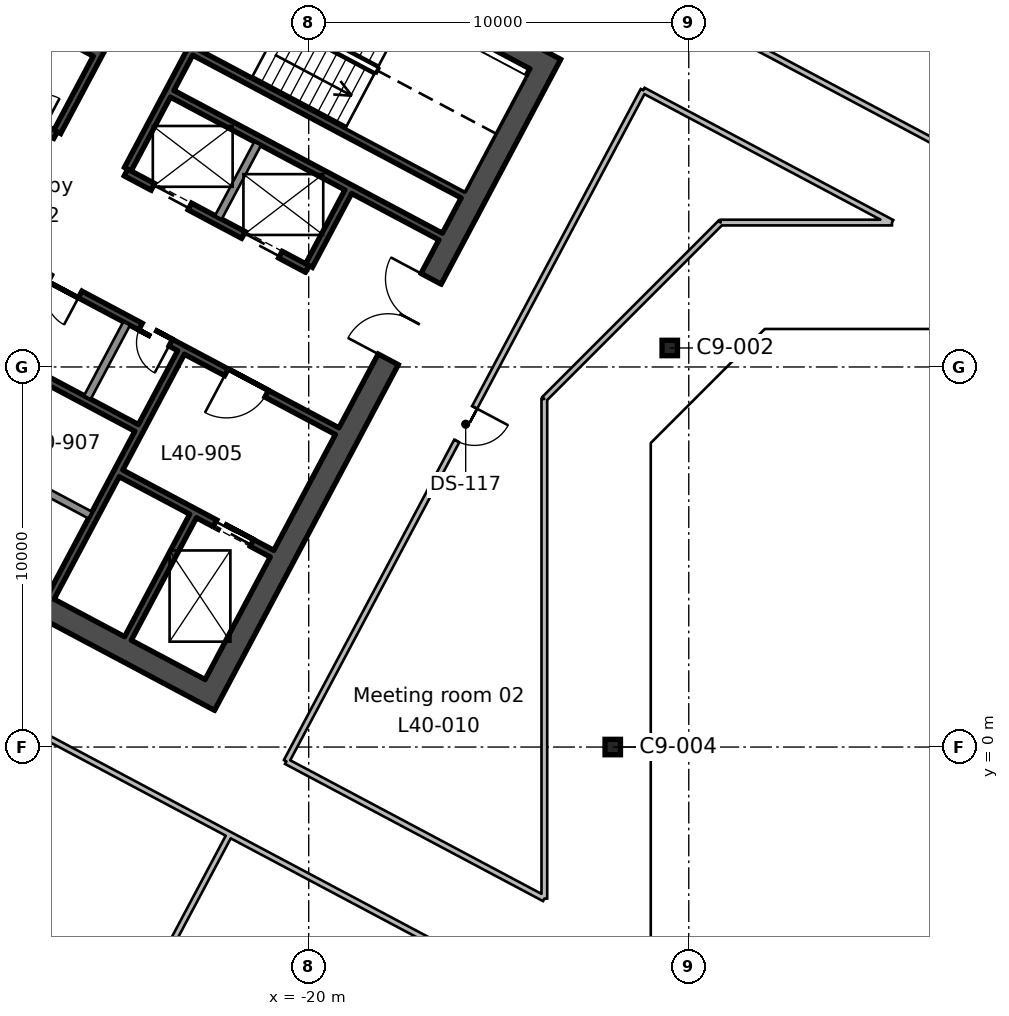
"""IFC4 building model, lengths in metres.
Left out: names, types, materials, properties, quantities, classifications, styles, units other than length and angle.
Written with IfcOpenShell. Run it as: python <this file> out.ifc"""

import sys

from ifc_helpers import new_model, si_unit, direction, frame, frame_2d, origin, origin_2d, place, context, subcontext, project, spatial, rectangle, hollow_rectangle, extrude, element, fill, save


model = new_model("IFC4")
c1 = context("Model", 3, precision=1e-05, world=origin(), true_north=direction((0.0, 1.0)))
c2 = subcontext(c1, "Body", "Model", "MODEL_VIEW")
j1 = project(units=[si_unit("LENGTHUNIT", "METRE"), si_unit("PLANEANGLEUNIT", "RADIAN")], contexts=[c1])
p1 = place(None, origin())
s1 = spatial("IfcSite", under=j1, at=p1, CompositionType="ELEMENT")
p2 = place(p1, origin())
s2 = spatial("IfcBuilding", under=s1, at=p2, CompositionType="ELEMENT")
p3 = place(p2, frame((0.0, 0.0, 189.6)))
s3 = spatial("IfcBuildingStorey", under=s2, at=p3, CompositionType="ELEMENT", Elevation=189.6)
for number, where, z_axis, x_axis in (
    (1, (-12.0, 0.0, 0.0), (0.0, 0.0, 1.0), (1.0, 0.0, 0.0)),
    (2, (-10.5, 10.5, 0.0), (0.0, 0.0, 1.0), (1.0, 0.0, 0.0)),
):
    element("IfcColumn", number, at=place(p3, frame(where, z_axis=z_axis, x_axis=x_axis)), inside=s3, PredefinedType="COLUMN", context=c2, shape_type="SweptSolid", body=[
        extrude(hollow_rectangle(XDim=0.406, YDim=0.406, WallThickness=0.015, InnerFilletRadius=0.007, OuterFilletRadius=0.022, at=origin_2d()), origin(), (0.0, 0.0, 1.0), 3.9),
    ])
p4 = place(p3, frame((-13.635, 18.236, 0.0), z_axis=(0.0, 0.0, 1.0), x_axis=(-0.469478769487, -0.88294376095, 0.0)))
e3 = element("IfcWall", 3, at=p4, inside=s3, PredefinedType="SHEAR", context=c2, shape_type="SweptSolid", body=[
    extrude(rectangle(XDim=19.4, YDim=0.6, at=frame_2d((9.7, 0.0))), origin(), (0.0, 0.0, 1.0), 3.9),
])
p5 = place(p4, frame((6.7, 0.0, 0.0)))
e4 = element("IfcOpeningElement", 4, at=p5, cuts=e3, PredefinedType="OPENING", context=c2, shape_type="SweptSolid", body=[
    extrude(rectangle(XDim=2.4, YDim=2.4, at=frame_2d((1.2, 1.2))), frame((0.0, 0.31, 0.0), z_axis=(0.0, -1.0, 0.0), x_axis=(1.0, 0.0, 0.0)), (0.0, 0.0, 1.0), 0.62),
])
p6 = place(p3, frame((-14.041, 18.112, 0.0), z_axis=(0.0, 0.0, 1.0), x_axis=(-0.882947755831, 0.46947125628, 0.0)))
e5 = element("IfcWall", 5, at=p6, inside=s3, PredefinedType="SHEAR", context=c2, shape_type="SweptSolid", body=[
    extrude(rectangle(XDim=20.2, YDim=0.6, at=frame_2d((10.1, 0.0))), origin(), (0.0, 0.0, 1.0), 3.9),
])
p7 = place(p3, frame((-22.867, 1.512, 0.0), z_axis=(0.0, 0.0, 1.0), x_axis=(-0.88294509198, 0.469476266226, 0.0)))
e6 = element("IfcWall", 6, at=p7, inside=s3, PredefinedType="SHEAR", context=c2, shape_type="SweptSolid", body=[
    extrude(rectangle(XDim=20.2, YDim=0.6, at=frame_2d((10.1, 0.0))), origin(), (0.0, 0.0, 1.0), 3.9),
])
p8 = place(p3, frame((-23.043, 6.08, 0.0), z_axis=(0.0, 0.0, 1.0), x_axis=(-0.469494272526, -0.882935517501, 0.0)))
e7 = element("IfcWall", 7, at=p8, inside=s3, PredefinedType="SHEAR", context=c2, shape_type="SweptSolid", body=[
    extrude(rectangle(XDim=3.65, YDim=0.2, at=frame_2d((1.825, 0.0))), origin(), (0.0, 0.0, 1.0), 3.9),
])
p9 = place(p3, frame((-18.96, 14.611, 0.0), z_axis=(0.0, 0.0, 1.0), x_axis=(-0.4694473164, -0.882960484464, 0.0)))
e8 = element("IfcWall", 8, at=p9, inside=s3, PredefinedType="SHEAR", context=c2, shape_type="SweptSolid", body=[
    extrude(rectangle(XDim=2.2, YDim=0.2, at=frame_2d((1.1, 0.0))), origin(), (0.0, 0.0, 1.0), 3.9),
])
p10 = place(p3, frame((-23.36, 10.382, 0.0), z_axis=(0.0, 0.0, 1.0), x_axis=(-0.469480409012, -0.88294288918, 0.0)))
e9 = element("IfcWall", 9, at=p10, inside=s3, PredefinedType="SHEAR", context=c2, shape_type="SweptSolid", body=[
    extrude(rectangle(XDim=7.3, YDim=0.2, at=frame_2d((3.65, 0.0))), origin(), (0.0, 0.0, 1.0), 3.9),
])
p11 = place(p3, frame((-21.344, 15.879, 0.0), z_axis=(0.0, 0.0, 1.0), x_axis=(-0.4694473164, -0.882960484464, 0.0)))
e10 = element("IfcWall", 10, at=p11, inside=s3, PredefinedType="SOLIDWALL", context=c2, shape_type="SweptSolid", body=[
    extrude(rectangle(XDim=2.2, YDim=0.2, at=frame_2d((1.1, 0.0))), origin(), (0.0, 0.0, 1.0), 3.9),
])
p12 = place(p3, frame((-24.791, 11.143, 0.0), z_axis=(0.0, 0.0, 1.0), x_axis=(-0.469487830541, -0.882938942948, 0.0)))
e11 = element("IfcWall", 11, at=p12, inside=s3, PredefinedType="SOLIDWALL", context=c2, shape_type="SweptSolid", body=[
    extrude(rectangle(XDim=2.2, YDim=0.2, at=frame_2d((1.1, 0.0))), origin(), (0.0, 0.0, 1.0), 3.9),
])
p13 = place(p3, frame((-21.333, 21.649, 0.0), z_axis=(0.0, 0.0, 1.0), x_axis=(-0.469494272526, -0.882935517501, 0.0)))
e12 = element("IfcWall", 12, at=p13, inside=s3, PredefinedType="SHEAR", context=c2, shape_type="SweptSolid", body=[
    extrude(rectangle(XDim=7.3, YDim=0.2, at=frame_2d((3.65, 0.0))), origin(), (0.0, 0.0, 1.0), 3.9),
])
p14 = place(p13, frame((1.3, 0.0, 0.0)))
e13 = element("IfcOpeningElement", 13, at=p14, cuts=e12, PredefinedType="OPENING", context=c2, shape_type="SweptSolid", body=[
    extrude(rectangle(XDim=1.2, YDim=2.1, at=frame_2d((0.6, 1.05))), frame((0.0, 0.11, 0.0), z_axis=(0.0, -1.0, 0.0), x_axis=(1.0, 0.0, 0.0)), (0.0, 0.0, 1.0), 0.22),
])
p15 = place(p3, frame((-23.188, 22.635, 0.0), z_axis=(0.0, 0.0, 1.0), x_axis=(-0.469454336211, -0.882956752176, 0.0)))
e14 = element("IfcWall", 14, at=p15, inside=s3, PredefinedType="SHEAR", context=c2, shape_type="SweptSolid", body=[
    extrude(rectangle(XDim=7.3, YDim=0.2, at=frame_2d((3.65, 0.0))), origin(), (0.0, 0.0, 1.0), 3.9),
])
p16 = place(p15, frame((0.45, 0.0, 0.0)))
e15 = element("IfcOpeningElement", 15, at=p16, cuts=e14, PredefinedType="OPENING", context=c2, shape_type="SweptSolid", body=[
    extrude(rectangle(XDim=0.9, YDim=2.1, at=frame_2d((0.45, 1.05))), frame((0.0, 0.11, 0.0), z_axis=(0.0, -1.0, 0.0), x_axis=(1.0, 0.0, 0.0)), (0.0, 0.0, 1.0), 0.22),
])
p17 = place(p15, frame((2.15, 0.0, 0.0)))
e16 = element("IfcOpeningElement", 16, at=p17, cuts=e14, PredefinedType="OPENING", context=c2, shape_type="SweptSolid", body=[
    extrude(rectangle(XDim=0.9, YDim=2.1, at=frame_2d((0.45, 1.05))), frame((0.0, 0.11, 0.0), z_axis=(0.0, -1.0, 0.0), x_axis=(1.0, 0.0, 0.0)), (0.0, 0.0, 1.0), 0.22),
])
p18 = place(p15, frame((3.75, 0.0, 0.0)))
e17 = element("IfcOpeningElement", 17, at=p18, cuts=e14, PredefinedType="OPENING", context=c2, shape_type="SweptSolid", body=[
    extrude(rectangle(XDim=0.9, YDim=2.1, at=frame_2d((0.45, 1.05))), frame((0.0, 0.11, 0.0), z_axis=(0.0, -1.0, 0.0), x_axis=(1.0, 0.0, 0.0)), (0.0, 0.0, 1.0), 0.22),
])
p19 = place(p3, frame((-15.942, 14.536, 0.0), z_axis=(0.0, 0.0, 1.0), x_axis=(-0.882946947542, 0.469472776449, 0.0)))
e18 = element("IfcWall", 18, at=p19, inside=s3, PredefinedType="SHEAR", context=c2, shape_type="SweptSolid", body=[
    extrude(rectangle(XDim=8.0, YDim=0.2, at=frame_2d((4.0, 0.0))), origin(), (0.0, 0.0, 1.0), 3.9),
])
p20 = place(p3, frame((-16.529, 13.432, 0.0), z_axis=(0.0, 0.0, 1.0), x_axis=(-0.88295287151, 0.469461634952, 0.0)))
e19 = element("IfcWall", 19, at=p20, inside=s3, PredefinedType="SHEAR", context=c2, shape_type="SweptSolid", body=[
    extrude(rectangle(XDim=8.0, YDim=0.2, at=frame_2d((4.0, 0.0))), origin(), (0.0, 0.0, 1.0), 3.9),
])
p21 = place(p3, frame((-25.623, 18.268, 0.0), z_axis=(0.0, 0.0, 1.0), x_axis=(-0.882953967957, 0.469459572775, 0.0)))
e20 = element("IfcWall", 20, at=p21, inside=s3, PredefinedType="SHEAR", context=c2, shape_type="SweptSolid", body=[
    extrude(rectangle(XDim=5.2, YDim=0.2, at=frame_2d((2.6, 0.0))), origin(), (0.0, 0.0, 1.0), 3.9),
])
p22 = place(p3, frame((-20.04, 12.581, 0.0), z_axis=(0.0, 0.0, 1.0), x_axis=(-0.882942972946, 0.469480251476, 0.0)))
e21 = element("IfcWall", 21, at=p22, inside=s3, PredefinedType="SHEAR", context=c2, shape_type="SweptSolid", body=[
    extrude(rectangle(XDim=5.4, YDim=0.2, at=frame_2d((2.7, 0.0))), origin(), (0.0, 0.0, 1.0), 3.9),
])
p23 = place(p22, frame((0.8, 0.0, 0.0)))
e22 = element("IfcOpeningElement", 22, at=p23, cuts=e21, PredefinedType="OPENING", context=c2, shape_type="SweptSolid", body=[
    extrude(rectangle(XDim=1.1, YDim=2.1, at=frame_2d((0.55, 1.05))), frame((0.0, 0.11, 0.0), z_axis=(0.0, -1.0, 0.0), x_axis=(1.0, 0.0, 0.0)), (0.0, 0.0, 1.0), 0.22),
])
p24 = place(p22, frame((3.5, 0.0, 0.0)))
e23 = element("IfcOpeningElement", 23, at=p24, cuts=e21, PredefinedType="OPENING", context=c2, shape_type="SweptSolid", body=[
    extrude(rectangle(XDim=1.1, YDim=2.1, at=frame_2d((0.55, 1.05))), frame((0.0, 0.11, 0.0), z_axis=(0.0, -1.0, 0.0), x_axis=(1.0, 0.0, 0.0)), (0.0, 0.0, 1.0), 0.22),
])
p25 = place(p3, frame((-26.662, 16.102, 0.0), z_axis=(0.0, 0.0, 1.0), x_axis=(-0.882940221191, 0.469485426614, 0.0)))
e24 = element("IfcWall", 24, at=p25, inside=s3, PredefinedType="SHEAR", context=c2, shape_type="SweptSolid", body=[
    extrude(rectangle(XDim=10.0, YDim=0.2, at=frame_2d((5.0, 0.0))), origin(), (0.0, 0.0, 1.0), 3.9),
])
p26 = place(p25, frame((6.3, 0.0, 0.0)))
e25 = element("IfcOpeningElement", 25, at=p26, cuts=e24, PredefinedType="OPENING", context=c2, shape_type="SweptSolid", body=[
    extrude(rectangle(XDim=1.2, YDim=2.1, at=frame_2d((0.6, 1.05))), frame((0.0, 0.11, 0.0), z_axis=(0.0, -1.0, 0.0), x_axis=(1.0, 0.0, 0.0)), (0.0, 0.0, 1.0), 0.22),
])
p27 = place(p25, frame((0.36, 0.0, 0.0)))
e26 = element("IfcOpeningElement", 26, at=p27, cuts=e24, PredefinedType="OPENING", context=c2, shape_type="SweptSolid", body=[
    extrude(rectangle(XDim=0.9, YDim=2.1, at=frame_2d((0.45, 1.05))), frame((0.0, 0.11, 0.0), z_axis=(0.0, -1.0, 0.0), x_axis=(1.0, 0.0, 0.0)), (0.0, 0.0, 1.0), 0.22),
])
p28 = place(p25, frame((3.06, 0.0, 0.0)))
e27 = element("IfcOpeningElement", 27, at=p28, cuts=e24, PredefinedType="OPENING", context=c2, shape_type="SweptSolid", body=[
    extrude(rectangle(XDim=0.9, YDim=2.1, at=frame_2d((0.45, 1.05))), frame((0.0, 0.11, 0.0), z_axis=(0.0, -1.0, 0.0), x_axis=(1.0, 0.0, 0.0)), (0.0, 0.0, 1.0), 0.22),
])
p29 = place(p3, frame((-19.252, 8.311, 0.0), z_axis=(0.0, 0.0, 1.0), x_axis=(-0.882955722218, 0.469456273365, 0.0)))
e28 = element("IfcWall", 28, at=p29, inside=s3, PredefinedType="SHEAR", context=c2, shape_type="SweptSolid", body=[
    extrude(rectangle(XDim=10.0, YDim=0.2, at=frame_2d((5.0, 0.0))), origin(), (0.0, 0.0, 1.0), 3.9),
])
p30 = place(p29, frame((2.1, 0.0, 0.0)))
e29 = element("IfcOpeningElement", 29, at=p30, cuts=e28, PredefinedType="OPENING", context=c2, shape_type="SweptSolid", body=[
    extrude(rectangle(XDim=1.2, YDim=2.1, at=frame_2d((0.6, 1.05))), frame((0.0, 0.11, 0.0), z_axis=(0.0, -1.0, 0.0), x_axis=(1.0, 0.0, 0.0)), (0.0, 0.0, 1.0), 0.22),
])
p31 = place(p29, frame((4.96, 0.0, 0.0)))
e30 = element("IfcOpeningElement", 30, at=p31, cuts=e28, PredefinedType="OPENING", context=c2, shape_type="SweptSolid", body=[
    extrude(rectangle(XDim=0.9, YDim=2.1, at=frame_2d((0.45, 1.05))), frame((0.0, 0.11, 0.0), z_axis=(0.0, -1.0, 0.0), x_axis=(1.0, 0.0, 0.0)), (0.0, 0.0, 1.0), 0.22),
])
p32 = place(p29, frame((7.66, 0.0, 0.0)))
e31 = element("IfcOpeningElement", 31, at=p32, cuts=e28, PredefinedType="OPENING", context=c2, shape_type="SweptSolid", body=[
    extrude(rectangle(XDim=0.9, YDim=2.1, at=frame_2d((0.45, 1.05))), frame((0.0, 0.11, 0.0), z_axis=(0.0, -1.0, 0.0), x_axis=(1.0, 0.0, 0.0)), (0.0, 0.0, 1.0), 0.22),
])
p33 = place(p3, frame((-24.528, 8.398, 0.0), z_axis=(0.0, 0.0, 1.0), x_axis=(-0.882953967957, 0.469459572775, 0.0)))
e32 = element("IfcWall", 32, at=p33, inside=s3, PredefinedType="SHEAR", context=c2, shape_type="SweptSolid", body=[
    extrude(rectangle(XDim=5.2, YDim=0.2, at=frame_2d((2.6, 0.0))), origin(), (0.0, 0.0, 1.0), 3.9),
])
p34 = place(p3, frame((-20.965, 5.088, 0.0), z_axis=(0.0, 0.0, 1.0), x_axis=(-0.882925986334, 0.469512196493, 0.0)))
e33 = element("IfcWall", 33, at=p34, inside=s3, PredefinedType="SHEAR", context=c2, shape_type="SweptSolid", body=[
    extrude(rectangle(XDim=4.5, YDim=0.2, at=frame_2d((2.25, 0.0))), origin(), (0.0, 0.0, 1.0), 3.9),
])
p35 = place(p34, frame((0.6, 0.0, 0.0)))
e34 = element("IfcOpeningElement", 34, at=p35, cuts=e33, PredefinedType="OPENING", context=c2, shape_type="SweptSolid", body=[
    extrude(rectangle(XDim=1.1, YDim=2.1, at=frame_2d((0.55, 1.05))), frame((0.0, 0.11, 0.0), z_axis=(0.0, -1.0, 0.0), x_axis=(1.0, 0.0, 0.0)), (0.0, 0.0, 1.0), 0.22),
])
p36 = place(p3, frame((-25.749, 6.103, 0.0), z_axis=(0.0, 0.0, 1.0), x_axis=(-0.882953967957, 0.469459572775, 0.0)))
e35 = element("IfcWall", 35, at=p36, inside=s3, PredefinedType="SOLIDWALL", context=c2, shape_type="SweptSolid", body=[
    extrude(rectangle(XDim=5.2, YDim=0.2, at=frame_2d((2.6, 0.0))), origin(), (0.0, 0.0, 1.0), 3.9),
])
p37 = place(p3, frame((-22.083, -2.302, 0.0), z_axis=(0.0, 0.0, 1.0), x_axis=(-0.469445946219, -0.882961212952, 0.0)))
e36 = element("IfcWall", 36, at=p37, inside=s3, PredefinedType="PARTITIONING", context=c2, shape_type="SweptSolid", body=[
    extrude(rectangle(XDim=8.8, YDim=0.15, at=frame_2d((4.4, 0.0))), origin(), (0.0, 0.0, 1.0), 3.54),
])
p38 = place(p3, frame((-48.541, 39.854, 0.0), z_axis=(0.0, 0.0, 1.0), x_axis=(0.882945008423, -0.469476423372, 0.0)))
e37 = element("IfcWall", 37, at=p38, inside=s3, PredefinedType="PARTITIONING", context=c2, shape_type="SweptSolid", body=[
    extrude(rectangle(XDim=54.976, YDim=0.15, at=frame_2d((27.488, 0.0))), origin(), (0.0, 0.0, 1.0), 3.54),
])
p39 = place(p38, frame((26.55, 0.0, 0.0)))
e38 = element("IfcOpeningElement", 38, at=p39, cuts=e37, PredefinedType="OPENING", context=c2, shape_type="SweptSolid", body=[
    extrude(rectangle(XDim=1.8, YDim=2.1, at=frame_2d((0.9, 1.05))), frame((0.0, 0.085, 0.0), z_axis=(0.0, -1.0, 0.0), x_axis=(1.0, 0.0, 0.0)), (0.0, 0.0, 1.0), 0.17),
])
p40 = place(p38, frame((21.049, 0.0, 0.0)))
e39 = element("IfcOpeningElement", 39, at=p40, cuts=e37, PredefinedType="OPENING", context=c2, shape_type="SweptSolid", body=[
    extrude(rectangle(XDim=1.0, YDim=2.1, at=frame_2d((0.5, 1.05))), frame((0.0, 0.085, 0.0), z_axis=(0.0, -1.0, 0.0), x_axis=(1.0, 0.0, 0.0)), (0.0, 0.0, 1.0), 0.17),
])
p41 = place(p38, frame((15.35, 0.0, 0.0)))
e40 = element("IfcOpeningElement", 40, at=p41, cuts=e37, PredefinedType="OPENING", context=c2, shape_type="SweptSolid", body=[
    extrude(rectangle(XDim=1.0, YDim=2.1, at=frame_2d((0.5, 1.05))), frame((0.0, 0.085, 0.0), z_axis=(0.0, -1.0, 0.0), x_axis=(1.0, 0.0, 0.0)), (0.0, 0.0, 1.0), 0.17),
])
p42 = place(p3, frame((-13.8, -6.706, 0.0), z_axis=(0.0, 0.0, 1.0), x_axis=(-0.882947286887, 0.469472138235, 0.0)))
e41 = element("IfcWall", 41, at=p42, inside=s3, PredefinedType="PARTITIONING", context=c2, shape_type="SweptSolid", body=[
    extrude(rectangle(XDim=36.571, YDim=0.15, at=frame_2d((18.285, 0.0))), origin(), (0.0, 0.0, 1.0), 3.54),
])
p43 = place(p42, frame((34.15, 0.0, 0.0)))
e42 = element("IfcOpeningElement", 42, at=p43, cuts=e41, PredefinedType="OPENING", context=c2, shape_type="SweptSolid", body=[
    extrude(rectangle(XDim=1.0, YDim=2.1, at=frame_2d((0.5, 1.05))), frame((0.0, 0.085, 0.0), z_axis=(0.0, -1.0, 0.0), x_axis=(1.0, 0.0, 0.0)), (0.0, 0.0, 1.0), 0.17),
])
p44 = place(p42, frame((17.35, 0.0, 0.0)))
e43 = element("IfcOpeningElement", 43, at=p44, cuts=e41, PredefinedType="OPENING", context=c2, shape_type="SweptSolid", body=[
    extrude(rectangle(XDim=1.8, YDim=2.1, at=frame_2d((0.9, 1.05))), frame((0.0, 0.085, 0.0), z_axis=(0.0, -1.0, 0.0), x_axis=(1.0, 0.0, 0.0)), (0.0, 0.0, 1.0), 0.17),
])
p45 = place(p3, frame((-20.588, -0.379, 0.0), z_axis=(0.0, 0.0, 1.0), x_axis=(0.469489882812, 0.882937851685, 0.0)))
e44 = element("IfcWall", 44, at=p45, inside=s3, PredefinedType="PARTITIONING", context=c2, shape_type="SweptSolid", body=[
    extrude(rectangle(XDim=20.0, YDim=0.15, at=frame_2d((10.0, 0.0))), origin(), (0.0, 0.0, 1.0), 3.54),
])
p46 = place(p45, frame((9.55, 0.0, 0.0)))
e45 = element("IfcOpeningElement", 45, at=p46, cuts=e44, PredefinedType="OPENING", context=c2, shape_type="SweptSolid", body=[
    extrude(rectangle(XDim=1.0, YDim=2.1, at=frame_2d((0.5, 1.05))), frame((0.0, 0.085, 0.0), z_axis=(0.0, -1.0, 0.0), x_axis=(1.0, 0.0, 0.0)), (0.0, 0.0, 1.0), 0.17),
])
p47 = place(p3, frame((-11.198, 17.28, 0.0), z_axis=(0.0, 0.0, 1.0), x_axis=(0.88294849999, -0.469469856717, 0.0)))
e46 = element("IfcWall", 46, at=p47, inside=s3, PredefinedType="PARTITIONING", context=c2, shape_type="SweptSolid", body=[
    extrude(rectangle(XDim=7.413, YDim=0.15, at=frame_2d((3.706, 0.0))), origin(), (0.0, 0.0, 1.0), 3.54),
])
p48 = place(p3, frame((-4.653, 13.8, 0.0), z_axis=(0.0, 0.0, 1.0), x_axis=(-1.0, 0.0, 0.0)))
e47 = element("IfcWall", 47, at=p48, inside=s3, PredefinedType="PARTITIONING", context=c2, shape_type="SweptSolid", body=[
    extrude(rectangle(XDim=4.507, YDim=0.15, at=frame_2d((2.253, 0.0))), origin(), (0.0, 0.0, 1.0), 3.54),
])
p49 = place(p3, frame((-9.16, 13.8, 0.0), z_axis=(0.0, 0.0, 1.0), x_axis=(-0.707106781187, -0.707106781187, 0.0)))
e48 = element("IfcWall", 48, at=p49, inside=s3, PredefinedType="PARTITIONING", context=c2, shape_type="SweptSolid", body=[
    extrude(rectangle(XDim=6.562, YDim=0.15, at=frame_2d((3.281, 0.0))), origin(), (0.0, 0.0, 1.0), 3.54),
])
p50 = place(p3, frame((-13.8, 9.16, 0.0), z_axis=(0.0, 0.0, 1.0), x_axis=(0.0, -1.0, 0.0)))
e49 = element("IfcWall", 49, at=p50, inside=s3, PredefinedType="PARTITIONING", context=c2, shape_type="SweptSolid", body=[
    extrude(rectangle(XDim=13.148, YDim=0.15, at=frame_2d((6.574, 0.0))), origin(), (0.0, 0.0, 1.0), 3.54),
])
p51 = place(p3, frame((-13.8, -3.988, 0.0), z_axis=(0.0, 0.0, 1.0), x_axis=(-0.882949137368, 0.469468657976, 0.0)))
e50 = element("IfcWall", 50, at=p51, inside=s3, PredefinedType="PARTITIONING", context=c2, shape_type="SweptSolid", body=[
    extrude(rectangle(XDim=7.688, YDim=0.15, at=frame_2d((3.844, 0.0))), origin(), (0.0, 0.0, 1.0), 3.54),
])
p52 = place(p5, frame((2.4, 0.0, 0.0), z_axis=(0.0, 0.0, 1.0), x_axis=(-1.0, 0.0, 0.0)))
e51 = element("IfcDoor", 51, at=p52, inside=s3, OperationType="DOUBLE_DOOR_SINGLE_SWING", PredefinedType="DOOR", context=c2, shape_type="SweptSolid", body=[
    extrude(rectangle(XDim=2.4, YDim=2.4, at=frame_2d((1.2, 1.2))), frame((0.0, 0.025, 0.0), z_axis=(0.0, -1.0, 0.0), x_axis=(1.0, 0.0, 0.0)), (0.0, 0.0, 1.0), 0.05),
])
fill(e4, e51)
p53 = place(p30, origin())
e52 = element("IfcDoor", 52, at=p53, inside=s3, OperationType="SINGLE_SWING_RIGHT", PredefinedType="DOOR", context=c2, shape_type="SweptSolid", body=[
    extrude(rectangle(XDim=1.2, YDim=2.1, at=frame_2d((0.6, 1.05))), frame((0.0, 0.025, 0.0), z_axis=(0.0, -1.0, 0.0), x_axis=(1.0, 0.0, 0.0)), (0.0, 0.0, 1.0), 0.05),
])
fill(e29, e52)
p54 = place(p31, origin())
e53 = element("IfcDoor", 53, at=p54, inside=s3, OperationType="SINGLE_SWING_LEFT", PredefinedType="DOOR", context=c2, shape_type="SweptSolid", body=[
    extrude(rectangle(XDim=0.9, YDim=2.1, at=frame_2d((0.45, 1.05))), frame((0.0, 0.025, 0.0), z_axis=(0.0, -1.0, 0.0), x_axis=(1.0, 0.0, 0.0)), (0.0, 0.0, 1.0), 0.05),
])
fill(e30, e53)
p55 = place(p32, origin())
e54 = element("IfcDoor", 54, at=p55, inside=s3, OperationType="SINGLE_SWING_LEFT", PredefinedType="DOOR", context=c2, shape_type="SweptSolid", body=[
    extrude(rectangle(XDim=0.9, YDim=2.1, at=frame_2d((0.45, 1.05))), frame((0.0, 0.025, 0.0), z_axis=(0.0, -1.0, 0.0), x_axis=(1.0, 0.0, 0.0)), (0.0, 0.0, 1.0), 0.05),
])
fill(e31, e54)
p56 = place(p23, origin())
e55 = element("IfcDoor", 55, at=p56, inside=s3, OperationType="DOUBLE_DOOR_SLIDING", PredefinedType="DOOR", context=c2, shape_type="SweptSolid", body=[
    extrude(rectangle(XDim=1.1, YDim=2.1, at=frame_2d((0.55, 1.05))), frame((0.0, 0.025, 0.0), z_axis=(0.0, -1.0, 0.0), x_axis=(1.0, 0.0, 0.0)), (0.0, 0.0, 1.0), 0.05),
])
fill(e22, e55)
p57 = place(p24, origin())
e56 = element("IfcDoor", 56, at=p57, inside=s3, OperationType="DOUBLE_DOOR_SLIDING", PredefinedType="DOOR", context=c2, shape_type="SweptSolid", body=[
    extrude(rectangle(XDim=1.1, YDim=2.1, at=frame_2d((0.55, 1.05))), frame((0.0, 0.025, 0.0), z_axis=(0.0, -1.0, 0.0), x_axis=(1.0, 0.0, 0.0)), (0.0, 0.0, 1.0), 0.05),
])
fill(e23, e56)
p58 = place(p35, origin())
e57 = element("IfcDoor", 57, at=p58, inside=s3, OperationType="DOUBLE_DOOR_SLIDING", PredefinedType="DOOR", context=c2, shape_type="SweptSolid", body=[
    extrude(rectangle(XDim=1.1, YDim=2.1, at=frame_2d((0.55, 1.05))), frame((0.0, 0.025, 0.0), z_axis=(0.0, -1.0, 0.0), x_axis=(1.0, 0.0, 0.0)), (0.0, 0.0, 1.0), 0.05),
])
fill(e34, e57)
p59 = place(p46, frame((1.0, 0.0, 0.0), z_axis=(0.0, 0.0, 1.0), x_axis=(-1.0, 0.0, 0.0)))
e58 = element("IfcDoor", 58, at=p59, inside=s3, OperationType="SINGLE_SWING_LEFT", PredefinedType="DOOR", context=c2, shape_type="SweptSolid", body=[
    extrude(rectangle(XDim=1.0, YDim=2.1, at=frame_2d((0.5, 1.05))), frame((0.0, 0.025, 0.0), z_axis=(0.0, -1.0, 0.0), x_axis=(1.0, 0.0, 0.0)), (0.0, 0.0, 1.0), 0.05),
])
fill(e45, e58)
save(model, sys.argv[1])
